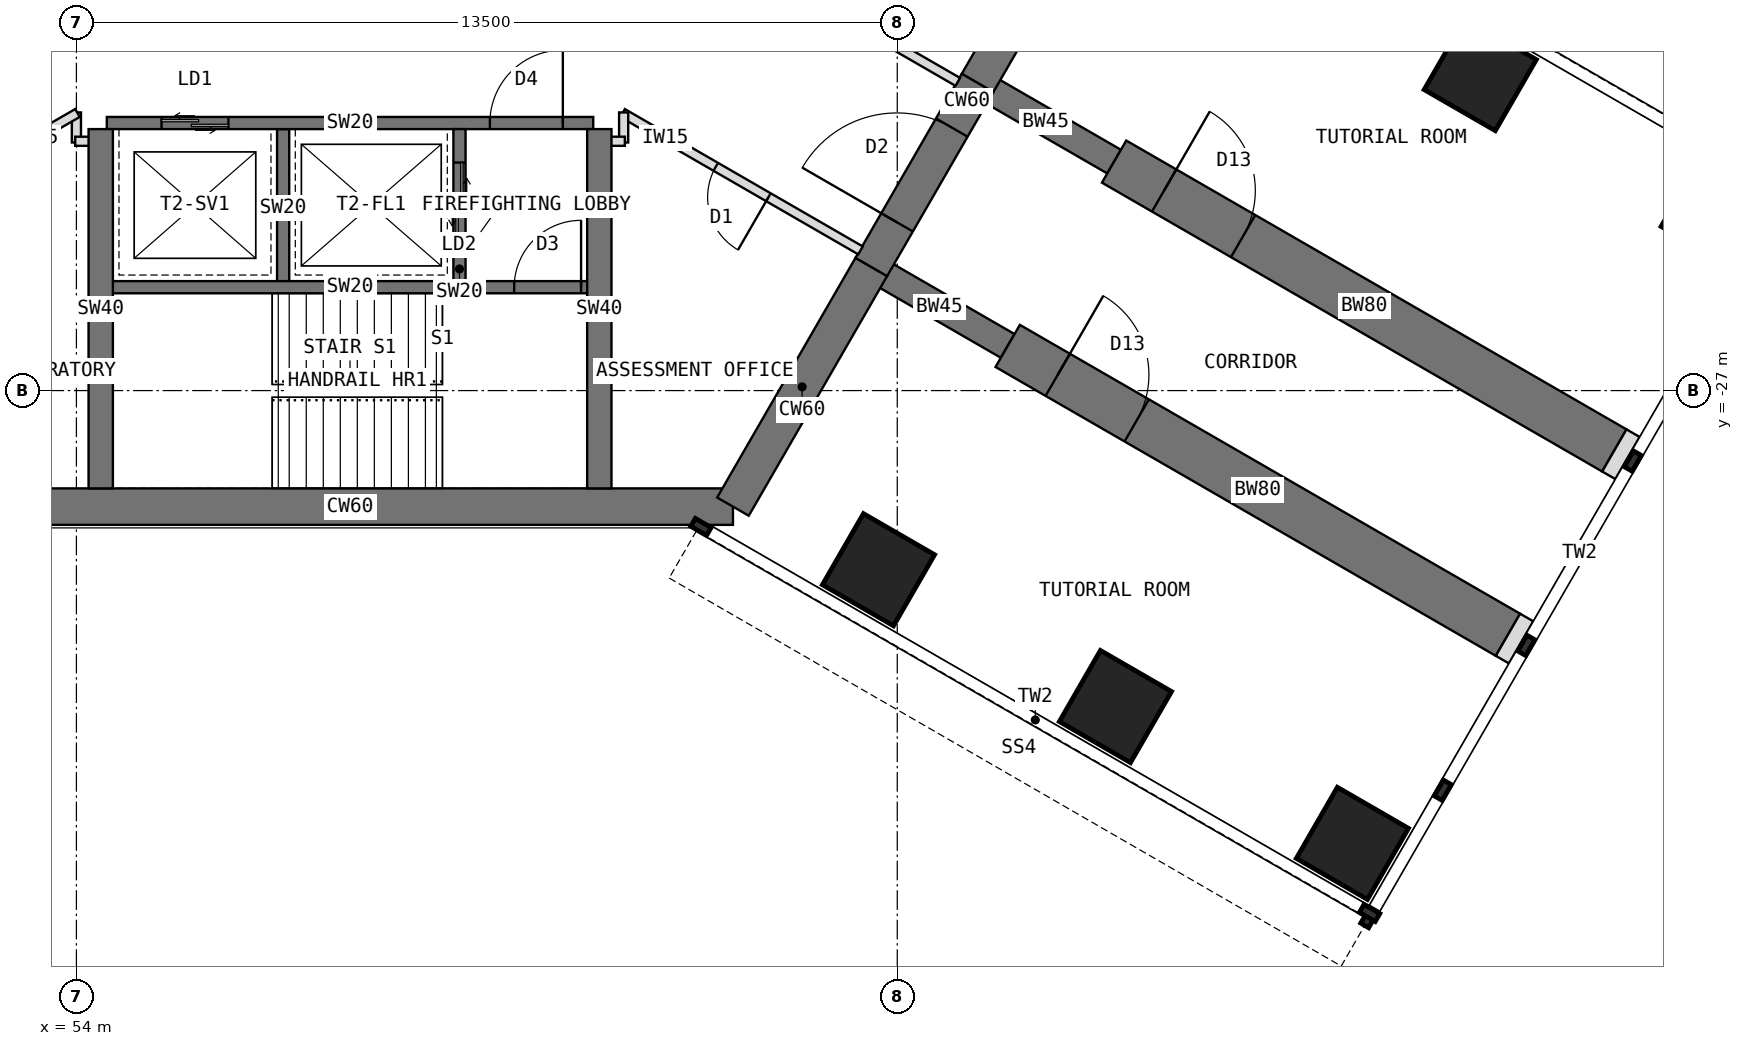
"""IFC4 building model, lengths in metres.
Left out: names, types, materials, properties, quantities, classifications, styles, units other than length and angle.
Written with IfcOpenShell. Run it as: python <this file> out.ifc"""

import sys

from ifc_helpers import new_model, si_unit, direction, frame, frame_2d, origin, origin_2d, place, context, subcontext, project, spatial, rectangle, extrude, element, fill, save


model = new_model("IFC4")
c1 = context("Model", 3, precision=1e-05, world=origin(), true_north=direction((0.0, 1.0)))
c2 = subcontext(c1, "Body", "Model", "MODEL_VIEW")
j1 = project(units=[si_unit("LENGTHUNIT", "METRE"), si_unit("PLANEANGLEUNIT", "RADIAN")], contexts=[c1])
p1 = place(None, origin())
s1 = spatial("IfcSite", under=j1, at=p1, CompositionType="ELEMENT")
p2 = place(p1, origin())
s2 = spatial("IfcBuilding", under=s1, at=p2, CompositionType="ELEMENT")
p3 = place(p2, frame((0.0, 0.0, 101.5)))
s3 = spatial("IfcBuildingStorey", under=s2, at=p3, CompositionType="ELEMENT", Elevation=101.5)
p4 = place(p3, frame((52.202, -28.908, 0.0), z_axis=(0.0, 0.0, 1.0), x_axis=(1.0, 0.0, 0.0)))
e1 = element("IfcWall", 1, at=p4, inside=s3, PredefinedType="SHEAR", context=c2, shape_type="SweptSolid", body=[
    extrude(rectangle(XDim=12.596, YDim=0.6, at=frame_2d((6.298, 0.0))), origin(), (0.0, 0.0, 1.0), 4.0),
])
p5 = place(p3, frame((64.798, -28.908, 0.0), z_axis=(0.0, 0.0, 1.0), x_axis=(0.499984222037, 0.866034513004, 0.0)))
e2 = element("IfcWall", 2, at=p5, inside=s3, PredefinedType="SHEAR", context=c2, shape_type="SweptSolid", body=[
    extrude(rectangle(XDim=4.548, YDim=0.6, at=frame_2d((2.274, 0.0))), origin(), (0.0, 0.0, 1.0), 4.0),
])
p6 = place(p3, frame((67.072, -24.97, 0.0), z_axis=(0.0, 0.0, 1.0), x_axis=(0.500010275428, 0.866019471182, 0.0)))
e3 = element("IfcWall", 3, at=p6, inside=s3, PredefinedType="SHEAR", context=c2, shape_type="SweptSolid", body=[
    extrude(rectangle(XDim=3.5, YDim=0.6, at=frame_2d((1.75, 0.0))), origin(), (0.0, 0.0, 1.0), 4.0),
])
p7 = place(p6, frame((0.85, 0.0, 0.0)))
e4 = element("IfcOpeningElement", 4, at=p7, cuts=e3, PredefinedType="OPENING", context=c2, shape_type="SweptSolid", body=[
    extrude(rectangle(XDim=1.8, YDim=2.1, at=frame_2d((0.9, 1.05))), frame((0.0, 0.31, 0.0), z_axis=(0.0, -1.0, 0.0), x_axis=(1.0, 0.0, 0.0)), (0.0, 0.0, 1.0), 0.62),
])
p8 = place(p3, frame((68.822, -21.939, 0.0), z_axis=(0.0, 0.0, 1.0), x_axis=(0.500024481964, 0.866011268655, 0.0)))
e5 = element("IfcWall", 5, at=p8, inside=s3, PredefinedType="SHEAR", context=c2, shape_type="SweptSolid", body=[
    extrude(rectangle(XDim=4.548, YDim=0.6, at=frame_2d((2.274, 0.0))), origin(), (0.0, 0.0, 1.0), 4.0),
])
p9 = place(p3, frame((68.822, -21.939, 0.0), z_axis=(0.0, 0.0, 1.0), x_axis=(0.866072649678, -0.499918158782, 0.0)))
e6 = element("IfcWall", 6, at=p9, inside=s3, PredefinedType="SHEAR", context=c2, shape_type="SweptSolid", body=[
    extrude(rectangle(XDim=2.592, YDim=0.45, at=frame_2d((1.296, 0.0))), origin(), (0.0, 0.0, 1.0), 4.0),
])
p10 = place(p3, frame((71.066, -23.234, 0.0), z_axis=(0.0, 0.0, 1.0), x_axis=(0.86602681393, -0.499997557548, 0.0)))
e7 = element("IfcWall", 7, at=p10, inside=s3, PredefinedType="SHEAR", context=c2, shape_type="SweptSolid", body=[
    extrude(rectangle(XDim=9.5, YDim=0.8, at=frame_2d((4.75, 0.0))), origin(), (0.0, 0.0, 1.0), 4.0),
])
p11 = place(p10, frame((0.95, 0.0, 0.0)))
e8 = element("IfcOpeningElement", 8, at=p11, cuts=e7, PredefinedType="OPENING", context=c2, shape_type="SweptSolid", body=[
    extrude(rectangle(XDim=1.5, YDim=2.1, at=frame_2d((0.75, 1.05))), frame((0.0, 0.41, 0.0), z_axis=(0.0, -1.0, 0.0), x_axis=(1.0, 0.0, 0.0)), (0.0, 0.0, 1.0), 0.82),
])
p12 = place(p3, frame((67.072, -24.97, 0.0), z_axis=(0.0, 0.0, 1.0), x_axis=(0.866031863473, -0.499988811324, 0.0)))
e9 = element("IfcWall", 9, at=p12, inside=s3, PredefinedType="SHEAR", context=c2, shape_type="SweptSolid", body=[
    extrude(rectangle(XDim=2.592, YDim=0.45, at=frame_2d((1.296, 0.0))), origin(), (0.0, 0.0, 1.0), 4.0),
])
p13 = place(p3, frame((69.316, -26.266, 0.0), z_axis=(0.0, 0.0, 1.0), x_axis=(0.86602681393, -0.499997557548, 0.0)))
e10 = element("IfcWall", 10, at=p13, inside=s3, PredefinedType="SHEAR", context=c2, shape_type="SweptSolid", body=[
    extrude(rectangle(XDim=9.5, YDim=0.8, at=frame_2d((4.75, 0.0))), origin(), (0.0, 0.0, 1.0), 4.0),
])
p14 = place(p13, frame((0.95, 0.0, 0.0)))
e11 = element("IfcOpeningElement", 11, at=p14, cuts=e10, PredefinedType="OPENING", context=c2, shape_type="SweptSolid", body=[
    extrude(rectangle(XDim=1.5, YDim=2.1, at=frame_2d((0.75, 1.05))), frame((0.0, 0.41, 0.0), z_axis=(0.0, -1.0, 0.0), x_axis=(1.0, 0.0, 0.0)), (0.0, 0.0, 1.0), 0.82),
])
for number, where, z_axis, x_axis in (
    (12, (67.191, -29.946, 0.0), (0.0, 0.0, 1.0), (0.5, 0.866, 0.0)),
    (13, (77.088, -21.804, 0.0), (0.0, 0.0, 1.0), (0.5, 0.866, 0.0)),
    (14, (71.088, -32.196, 0.0), (0.0, 0.0, 1.0), (0.5, 0.866, 0.0)),
    (15, (80.986, -24.054, 0.0), (0.0, 0.0, 1.0), (0.5, 0.866, 0.0)),
    (16, (74.986, -34.446, 0.0), (0.0, 0.0, 1.0), (0.5, 0.866, 0.0)),
):
    element("IfcColumn", number, at=place(p3, frame(where, z_axis=z_axis, x_axis=x_axis)), inside=s3, PredefinedType="COLUMN", context=c2, shape_type="SweptSolid", body=[
        extrude(rectangle(XDim=1.35, YDim=1.35, at=origin_2d()), origin(), (0.0, 0.0, 1.0), 4.0),
    ])
for number, where, z_axis, x_axis in (
    (17, (79.294, -27.984, 0.0), (0.0, 0.0, 1.0), (0.866, -0.5, 0.0)),
    (18, (77.544, -31.016, 0.0), (0.0, 0.0, 1.0), (0.866, -0.5, 0.0)),
):
    element("IfcWall", number, at=place(p3, frame(where, z_axis=z_axis, x_axis=x_axis)), inside=s3, PredefinedType="PARTITIONING", context=c2, shape_type="SweptSolid", body=[
        extrude(rectangle(XDim=0.25, YDim=0.8, at=frame_2d((0.125, 0.0))), origin(), (0.0, 0.0, 1.0), 3.8),
    ])
p15 = place(p3, frame((54.5, -22.6, 0.0), z_axis=(0.0, 0.0, 1.0), x_axis=(1.0, 0.0, 0.0)))
e19 = element("IfcWall", 19, at=p15, inside=s3, PredefinedType="SHEAR", context=c2, shape_type="SweptSolid", body=[
    extrude(rectangle(XDim=8.0, YDim=0.2, at=frame_2d((4.0, 0.0))), origin(), (0.0, 0.0, 1.0), 4.0),
])
p16 = place(p15, frame((6.3, 0.0, 0.0)))
e20 = element("IfcOpeningElement", 20, at=p16, cuts=e19, PredefinedType="OPENING", context=c2, shape_type="SweptSolid", body=[
    extrude(rectangle(XDim=1.2, YDim=2.1, at=frame_2d((0.6, 1.05))), frame((0.0, 0.11, 0.0), z_axis=(0.0, -1.0, 0.0), x_axis=(1.0, 0.0, 0.0)), (0.0, 0.0, 1.0), 0.22),
])
p17 = place(p15, frame((0.9, 0.0, 0.0)))
e21 = element("IfcOpeningElement", 21, at=p17, cuts=e19, PredefinedType="OPENING", context=c2, shape_type="SweptSolid", body=[
    extrude(rectangle(XDim=1.1, YDim=2.2, at=frame_2d((0.55, 1.1))), frame((0.0, 0.11, 0.0), z_axis=(0.0, -1.0, 0.0), x_axis=(1.0, 0.0, 0.0)), (0.0, 0.0, 1.0), 0.22),
])
p18 = place(p3, frame((57.4, -22.7, 0.0), z_axis=(0.0, 0.0, 1.0), x_axis=(0.0, -1.0, 0.0)))
e22 = element("IfcWall", 22, at=p18, inside=s3, PredefinedType="SHEAR", context=c2, shape_type="SweptSolid", body=[
    extrude(rectangle(XDim=2.6, YDim=0.2, at=frame_2d((1.3, 0.0))), origin(), (0.0, 0.0, 1.0), 4.0),
])
p19 = place(p3, frame((60.3, -22.7, 0.0), z_axis=(0.0, 0.0, 1.0), x_axis=(0.0, -1.0, 0.0)))
e23 = element("IfcWall", 23, at=p19, inside=s3, PredefinedType="SHEAR", context=c2, shape_type="SweptSolid", body=[
    extrude(rectangle(XDim=2.6, YDim=0.2, at=frame_2d((1.3, 0.0))), origin(), (0.0, 0.0, 1.0), 4.0),
])
p20 = place(p19, frame((0.55, 0.0, 0.0)))
e24 = element("IfcOpeningElement", 24, at=p20, cuts=e23, PredefinedType="OPENING", context=c2, shape_type="SweptSolid", body=[
    extrude(rectangle(XDim=1.3, YDim=2.2, at=frame_2d((0.65, 1.1))), frame((0.0, 0.11, 0.0), z_axis=(0.0, -1.0, 0.0), x_axis=(1.0, 0.0, 0.0)), (0.0, 0.0, 1.0), 0.22),
])
p21 = place(p3, frame((54.5, -25.3, 0.0), z_axis=(0.0, 0.0, 1.0), x_axis=(1.0, 0.0, 0.0)))
e25 = element("IfcWall", 25, at=p21, inside=s3, PredefinedType="SHEAR", context=c2, shape_type="SweptSolid", body=[
    extrude(rectangle(XDim=8.0, YDim=0.2, at=frame_2d((4.0, 0.0))), origin(), (0.0, 0.0, 1.0), 4.0),
])
p22 = place(p21, frame((6.7, 0.0, 0.0)))
e26 = element("IfcOpeningElement", 26, at=p22, cuts=e25, PredefinedType="OPENING", context=c2, shape_type="SweptSolid", body=[
    extrude(rectangle(XDim=1.1, YDim=2.1, at=frame_2d((0.55, 1.05))), frame((0.0, 0.11, 0.0), z_axis=(0.0, -1.0, 0.0), x_axis=(1.0, 0.0, 0.0)), (0.0, 0.0, 1.0), 0.22),
])
for number, where, z_axis, x_axis in (
    (27, (62.6, -22.7, 0.0), (0.0, 0.0, 1.0), (0.0, -1.0, 0.0)),
    (28, (54.4, -22.7, 0.0), (0.0, 0.0, 1.0), (0.0, -1.0, 0.0)),
):
    element("IfcWall", number, at=place(p3, frame(where, z_axis=z_axis, x_axis=x_axis)), inside=s3, PredefinedType="SHEAR", context=c2, shape_type="SweptSolid", body=[
        extrude(rectangle(XDim=5.908, YDim=0.4, at=frame_2d((2.954, 0.0))), origin(), (0.0, 0.0, 1.0), 4.0),
    ])
p23 = place(p3, frame((54.0, -22.92, 0.0), z_axis=(0.0, 0.0, 1.0), x_axis=(0.0, 1.0, 0.0)))
e29 = element("IfcWall", 29, at=p23, inside=s3, PredefinedType="PARTITIONING", context=c2, shape_type="SweptSolid", body=[
    extrude(rectangle(XDim=0.494, YDim=0.15, at=frame_2d((0.247, 0.0))), origin(), (0.0, 0.0, 1.0), 3.8),
])
p24 = place(p3, frame((54.017, -22.436, 0.0), z_axis=(0.0, 0.0, 1.0), x_axis=(-0.86602002524, -0.500009315796, 0.0)))
e30 = element("IfcWall", 30, at=p24, inside=s3, PredefinedType="PARTITIONING", context=c2, shape_type="SweptSolid", body=[
    extrude(rectangle(XDim=4.519, YDim=0.15, at=frame_2d((2.259, 0.0))), origin(), (0.0, 0.0, 1.0), 3.8),
])
p25 = place(p24, frame((1.769, 0.0, 0.0)))
e31 = element("IfcOpeningElement", 31, at=p25, cuts=e30, PredefinedType="OPENING", context=c2, shape_type="SweptSolid", body=[
    extrude(rectangle(XDim=1.0, YDim=2.1, at=frame_2d((0.5, 1.05))), frame((0.0, 0.085, 0.0), z_axis=(0.0, -1.0, 0.0), x_axis=(1.0, 0.0, 0.0)), (0.0, 0.0, 1.0), 0.17),
])
p26 = place(p3, frame((64.583, -19.664, 0.0), z_axis=(0.0, 0.0, 1.0), x_axis=(0.866006515865, -0.500032713409, 0.0)))
e32 = element("IfcWall", 32, at=p26, inside=s3, PredefinedType="PARTITIONING", context=c2, shape_type="SweptSolid", body=[
    extrude(rectangle(XDim=4.518, YDim=0.15, at=frame_2d((2.259, 0.0))), origin(), (0.0, 0.0, 1.0), 3.8),
])
p27 = place(p26, frame((1.769, 0.0, 0.0)))
e33 = element("IfcOpeningElement", 33, at=p27, cuts=e32, PredefinedType="OPENING", context=c2, shape_type="SweptSolid", body=[
    extrude(rectangle(XDim=1.0, YDim=2.1, at=frame_2d((0.5, 1.05))), frame((0.0, 0.085, 0.0), z_axis=(0.0, -1.0, 0.0), x_axis=(1.0, 0.0, 0.0)), (0.0, 0.0, 1.0), 0.17),
])
p28 = place(p3, frame((66.896, -24.695, 0.0), z_axis=(0.0, 0.0, 1.0), x_axis=(-0.86602002524, 0.500009315796, 0.0)))
e34 = element("IfcWall", 34, at=p28, inside=s3, PredefinedType="PARTITIONING", context=c2, shape_type="SweptSolid", body=[
    extrude(rectangle(XDim=4.519, YDim=0.15, at=frame_2d((2.259, 0.0))), origin(), (0.0, 0.0, 1.0), 3.8),
])
p29 = place(p28, frame((1.749, 0.0, 0.0)))
e35 = element("IfcOpeningElement", 35, at=p29, cuts=e34, PredefinedType="OPENING", context=c2, shape_type="SweptSolid", body=[
    extrude(rectangle(XDim=1.0, YDim=2.1, at=frame_2d((0.5, 1.05))), frame((0.0, 0.085, 0.0), z_axis=(0.0, -1.0, 0.0), x_axis=(1.0, 0.0, 0.0)), (0.0, 0.0, 1.0), 0.17),
])
p30 = place(p3, frame((63.0, -22.426, 0.0), z_axis=(0.0, 0.0, 1.0), x_axis=(0.0, -1.0, 0.0)))
e36 = element("IfcWall", 36, at=p30, inside=s3, PredefinedType="PARTITIONING", context=c2, shape_type="SweptSolid", body=[
    extrude(rectangle(XDim=0.494, YDim=0.15, at=frame_2d((0.247, 0.0))), origin(), (0.0, 0.0, 1.0), 3.8),
])
for number, where, z_axis, x_axis in (
    (37, (63.02, -22.9, 0.0), (0.0, 0.0, 1.0), (-1.0, 0.0, 0.0)),
    (38, (54.41, -22.9, 0.0), (0.0, 0.0, 1.0), (-1.0, 0.0, 0.0)),
):
    element("IfcWall", number, at=place(p3, frame(where, z_axis=z_axis, x_axis=x_axis)), inside=s3, PredefinedType="PARTITIONING", context=c2, shape_type="SweptSolid", body=[
        extrude(rectangle(XDim=0.43, YDim=0.15, at=frame_2d((0.215, 0.0))), origin(), (0.0, 0.0, 1.0), 3.8),
    ])
p31 = place(p16, origin())
e39 = element("IfcDoor", 39, at=p31, inside=s3, OperationType="SINGLE_SWING_RIGHT", PredefinedType="DOOR", context=c2, shape_type="SweptSolid", body=[
    extrude(rectangle(XDim=1.2, YDim=2.1, at=frame_2d((0.6, 1.05))), frame((0.0, 0.025, 0.0), z_axis=(0.0, -1.0, 0.0), x_axis=(1.0, 0.0, 0.0)), (0.0, 0.0, 1.0), 0.05),
])
fill(e20, e39)
p32 = place(p20, origin())
e40 = element("IfcDoor", 40, at=p32, inside=s3, OperationType="DOUBLE_DOOR_SLIDING", PredefinedType="DOOR", context=c2, shape_type="SweptSolid", body=[
    extrude(rectangle(XDim=1.3, YDim=2.2, at=frame_2d((0.65, 1.1))), frame((0.0, 0.025, 0.0), z_axis=(0.0, -1.0, 0.0), x_axis=(1.0, 0.0, 0.0)), (0.0, 0.0, 1.0), 0.05),
])
fill(e24, e40)
p33 = place(p17, origin())
e41 = element("IfcDoor", 41, at=p33, inside=s3, OperationType="DOUBLE_DOOR_SLIDING", PredefinedType="DOOR", context=c2, shape_type="SweptSolid", body=[
    extrude(rectangle(XDim=1.1, YDim=2.2, at=frame_2d((0.55, 1.1))), frame((0.0, 0.025, 0.0), z_axis=(0.0, -1.0, 0.0), x_axis=(1.0, 0.0, 0.0)), (0.0, 0.0, 1.0), 0.05),
])
fill(e21, e41)
p34 = place(p22, origin())
e42 = element("IfcDoor", 42, at=p34, inside=s3, OperationType="SINGLE_SWING_RIGHT", PredefinedType="DOOR", context=c2, shape_type="SweptSolid", body=[
    extrude(rectangle(XDim=1.1, YDim=2.1, at=frame_2d((0.55, 1.05))), frame((0.0, 0.025, 0.0), z_axis=(0.0, -1.0, 0.0), x_axis=(1.0, 0.0, 0.0)), (0.0, 0.0, 1.0), 0.05),
])
fill(e26, e42)
p35 = place(p7, origin())
e43 = element("IfcDoor", 43, at=p35, inside=s3, OperationType="DOUBLE_DOOR_DOUBLE_SWING", PredefinedType="DOOR", context=c2, shape_type="SweptSolid", body=[
    extrude(rectangle(XDim=1.72, YDim=2.06, at=frame_2d((0.9, 1.03))), frame((0.0, 0.025, 0.0), z_axis=(0.0, -1.0, 0.0), x_axis=(1.0, 0.0, 0.0)), (0.0, 0.0, 1.0), 0.05),
    extrude(rectangle(XDim=0.04, YDim=2.1, at=frame_2d((0.02, 1.05))), frame((0.0, 0.3, 0.0), z_axis=(0.0, -1.0, 0.0), x_axis=(1.0, 0.0, 0.0)), (0.0, 0.0, 1.0), 0.6),
    extrude(rectangle(XDim=0.04, YDim=2.1, at=frame_2d((1.78, 1.05))), frame((0.0, 0.3, 0.0), z_axis=(0.0, -1.0, 0.0), x_axis=(1.0, 0.0, 0.0)), (0.0, 0.0, 1.0), 0.6),
    extrude(rectangle(XDim=1.72, YDim=0.04, at=frame_2d((0.9, 2.08))), frame((0.0, 0.3, 0.0), z_axis=(0.0, -1.0, 0.0), x_axis=(1.0, 0.0, 0.0)), (0.0, 0.0, 1.0), 0.6),
])
fill(e4, e43)
p36 = place(p29, origin())
e44 = element("IfcDoor", 44, at=p36, inside=s3, OperationType="SINGLE_SWING_LEFT", PredefinedType="DOOR", context=c2, shape_type="SweptSolid", body=[
    extrude(rectangle(XDim=1.0, YDim=2.1, at=frame_2d((0.5, 1.05))), frame((0.0, 0.025, 0.0), z_axis=(0.0, -1.0, 0.0), x_axis=(1.0, 0.0, 0.0)), (0.0, 0.0, 1.0), 0.05),
])
fill(e35, e44)
p37 = place(p11, origin())
e45 = element("IfcDoor", 45, at=p37, inside=s3, OperationType="DOUBLE_DOOR_SINGLE_SWING", PredefinedType="DOOR", context=c2, shape_type="SweptSolid", body=[
    extrude(rectangle(XDim=1.42, YDim=2.06, at=frame_2d((0.75, 1.03))), frame((0.0, 0.025, 0.0), z_axis=(0.0, -1.0, 0.0), x_axis=(1.0, 0.0, 0.0)), (0.0, 0.0, 1.0), 0.05),
    extrude(rectangle(XDim=0.04, YDim=2.1, at=frame_2d((0.02, 1.05))), frame((0.0, 0.4, 0.0), z_axis=(0.0, -1.0, 0.0), x_axis=(1.0, 0.0, 0.0)), (0.0, 0.0, 1.0), 0.8),
    extrude(rectangle(XDim=0.04, YDim=2.1, at=frame_2d((1.48, 1.05))), frame((0.0, 0.4, 0.0), z_axis=(0.0, -1.0, 0.0), x_axis=(1.0, 0.0, 0.0)), (0.0, 0.0, 1.0), 0.8),
    extrude(rectangle(XDim=1.42, YDim=0.04, at=frame_2d((0.75, 2.08))), frame((0.0, 0.4, 0.0), z_axis=(0.0, -1.0, 0.0), x_axis=(1.0, 0.0, 0.0)), (0.0, 0.0, 1.0), 0.8),
])
fill(e8, e45)
p38 = place(p14, origin())
e46 = element("IfcDoor", 46, at=p38, inside=s3, OperationType="DOUBLE_DOOR_SINGLE_SWING", PredefinedType="DOOR", context=c2, shape_type="SweptSolid", body=[
    extrude(rectangle(XDim=1.42, YDim=2.06, at=frame_2d((0.75, 1.03))), frame((0.0, 0.025, 0.0), z_axis=(0.0, -1.0, 0.0), x_axis=(1.0, 0.0, 0.0)), (0.0, 0.0, 1.0), 0.05),
    extrude(rectangle(XDim=0.04, YDim=2.1, at=frame_2d((0.02, 1.05))), frame((0.0, 0.4, 0.0), z_axis=(0.0, -1.0, 0.0), x_axis=(1.0, 0.0, 0.0)), (0.0, 0.0, 1.0), 0.8),
    extrude(rectangle(XDim=0.04, YDim=2.1, at=frame_2d((1.48, 1.05))), frame((0.0, 0.4, 0.0), z_axis=(0.0, -1.0, 0.0), x_axis=(1.0, 0.0, 0.0)), (0.0, 0.0, 1.0), 0.8),
    extrude(rectangle(XDim=1.42, YDim=0.04, at=frame_2d((0.75, 2.08))), frame((0.0, 0.4, 0.0), z_axis=(0.0, -1.0, 0.0), x_axis=(1.0, 0.0, 0.0)), (0.0, 0.0, 1.0), 0.8),
])
fill(e11, e46)
save(model, sys.argv[1])
